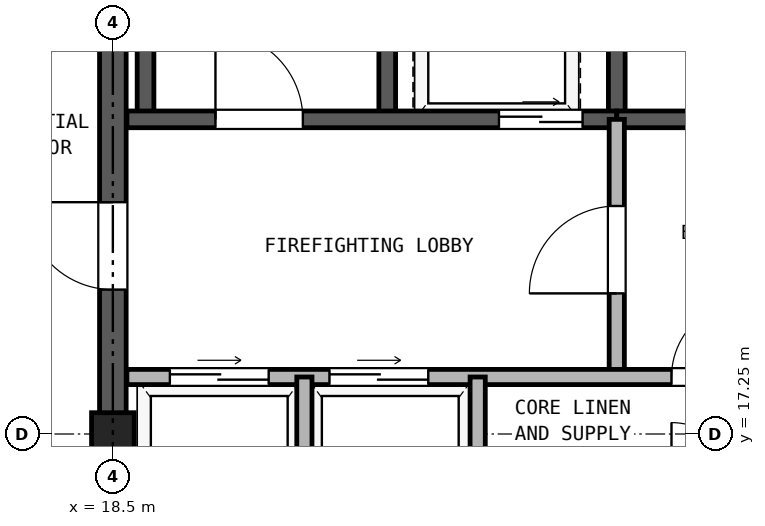
"""IFC4 building model, lengths in metres.
Left out: names, types, materials, properties, quantities, classifications, styles, units other than length and angle.
Written with IfcOpenShell. Run it as: python <this file> out.ifc"""

import sys

from ifc_helpers import new_model, si_unit, direction, frame, frame_2d, origin, origin_2d, place, context, subcontext, project, spatial, rectangle, hollow_rectangle, extrude, source, transform, mapped, element, fill, save


model = new_model("IFC4")
c1 = context("Model", 3, precision=1e-05, world=origin(), true_north=direction((0.0, 1.0)))
c2 = subcontext(c1, "Body", "Model", "MODEL_VIEW")
j1 = project(units=[si_unit("LENGTHUNIT", "METRE"), si_unit("PLANEANGLEUNIT", "RADIAN")], contexts=[c1])
p1 = place(None, origin())
s1 = spatial("IfcSite", under=j1, at=p1, CompositionType="ELEMENT")
p2 = place(p1, origin())
s2 = spatial("IfcBuilding", under=s1, at=p2, CompositionType="ELEMENT")
p3 = place(p2, frame((0.0, 0.0, 245.7)))
s3 = spatial("IfcBuildingStorey", under=s2, at=p3, CompositionType="ELEMENT", Elevation=245.7)
m1 = source(origin(), c2, "Body", "SweptSolid", [
    extrude(hollow_rectangle(XDim=0.56, YDim=0.56, WallThickness=0.03, at=origin_2d()), origin(), (0.0, 0.0, 1.0), 2.98),
])
p4 = place(p3, frame((18.5, 17.25, 0.0), z_axis=(0.0, 0.0, 1.0), x_axis=(1.0, 0.0, 0.0)))
e1 = element("IfcColumn", 1, at=p4, inside=s3, PredefinedType="COLUMN", context=c2, shape_type="MappedRepresentation", body=[
    mapped(m1, transform((0.0, 0.0, 0.0), x_axis=(1.0, 0.0, 0.0), y_axis=(0.0, 1.0, 0.0), z_axis=(0.0, 0.0, 1.0), scale=1.0)),
])
p5 = place(p3, frame((18.5, 11.675, 0.0), z_axis=(0.0, 0.0, 1.0), x_axis=(0.0, 1.0, 0.0)))
e2 = element("IfcWall", 2, at=p5, inside=s3, PredefinedType="SHEAR", context=c2, shape_type="SweptSolid", body=[
    extrude(rectangle(XDim=16.9, YDim=0.35, at=frame_2d((8.45, 0.0))), origin(), (0.0, 0.0, 1.0), 2.98),
])
p6 = place(p5, frame((7.475, 0.0, 0.0)))
e3 = element("IfcOpeningElement", 3, at=p6, cuts=e2, PredefinedType="OPENING", context=c2, shape_type="SweptSolid", body=[
    extrude(rectangle(XDim=1.15, YDim=2.2, at=frame_2d((0.575, 1.1))), frame((0.0, 0.185, 0.0), z_axis=(0.0, -1.0, 0.0), x_axis=(1.0, 0.0, 0.0)), (0.0, 0.0, 1.0), 0.37),
])
for number, where, z_axis, x_axis in (
    (4, (18.93, 21.39, 0.0), (0.0, 0.0, 1.0), (0.0, 1.0, 0.0)),
    (5, (22.11, 21.39, 0.0), (0.0, 0.0, 1.0), (0.0, 1.0, 0.0)),
    (6, (25.13, 21.39, 0.0), (0.0, 0.0, 1.0), (0.0, 1.0, 0.0)),
):
    element("IfcWall", number, at=place(p3, frame(where, z_axis=z_axis, x_axis=x_axis)), inside=s3, PredefinedType="SOLIDWALL", context=c2, shape_type="SweptSolid", body=[
        extrude(rectangle(XDim=7.11, YDim=0.22, at=frame_2d((3.555, 0.0))), origin(), (0.0, 0.0, 1.0), 2.98),
    ])
p7 = place(p3, frame((18.685, 21.39, 0.0), z_axis=(0.0, 0.0, 1.0), x_axis=(1.0, 0.0, 0.0)))
e7 = element("IfcWall", 7, at=p7, inside=s3, PredefinedType="SOLIDWALL", context=c2, shape_type="SweptSolid", body=[
    extrude(rectangle(XDim=6.445, YDim=0.22, at=frame_2d((3.222, 0.0))), origin(), (0.0, 0.0, 1.0), 2.98),
])
p8 = place(p7, frame((1.165, 0.0, 0.0)))
e8 = element("IfcOpeningElement", 8, at=p8, cuts=e7, PredefinedType="OPENING", context=c2, shape_type="SweptSolid", body=[
    extrude(rectangle(XDim=1.15, YDim=2.2, at=frame_2d((0.575, 1.1))), frame((0.0, 0.12, 0.0), z_axis=(0.0, -1.0, 0.0), x_axis=(1.0, 0.0, 0.0)), (0.0, 0.0, 1.0), 0.24),
])
p9 = place(p7, frame((4.895, 0.0, 0.0)))
e9 = element("IfcOpeningElement", 9, at=p9, cuts=e7, PredefinedType="OPENING", context=c2, shape_type="SweptSolid", body=[
    extrude(rectangle(XDim=1.1, YDim=2.25, at=frame_2d((0.55, 1.125))), frame((0.0, 0.12, 0.0), z_axis=(0.0, -1.0, 0.0), x_axis=(1.0, 0.0, 0.0)), (0.0, 0.0, 1.0), 0.24),
])
p10 = place(p3, frame((25.13, 21.39, 0.0), z_axis=(0.0, 0.0, 1.0), x_axis=(1.0, 0.0, 0.0)))
e10 = element("IfcWall", 10, at=p10, inside=s3, PredefinedType="SOLIDWALL", context=c2, shape_type="SweptSolid", body=[
    extrude(rectangle(XDim=3.185, YDim=0.22, at=frame_2d((1.593, 0.0))), origin(), (0.0, 0.0, 1.0), 2.98),
])
p11 = place(p10, frame((0.92, 0.0, 0.0)))
e11 = element("IfcOpeningElement", 11, at=p11, cuts=e10, PredefinedType="OPENING", context=c2, shape_type="SweptSolid", body=[
    extrude(rectangle(XDim=1.15, YDim=2.2, at=frame_2d((0.575, 1.1))), frame((0.0, 0.12, 0.0), z_axis=(0.0, -1.0, 0.0), x_axis=(1.0, 0.0, 0.0)), (0.0, 0.0, 1.0), 0.24),
])
p12 = place(p3, frame((25.13, 18.0, 0.0), z_axis=(0.0, 0.0, 1.0), x_axis=(0.0, 1.0, 0.0)))
e12 = element("IfcWall", 12, at=p12, inside=s3, PredefinedType="PARTITIONING", context=c2, shape_type="SweptSolid", body=[
    extrude(rectangle(XDim=3.39, YDim=0.2, at=frame_2d((1.695, 0.0))), origin(), (0.0, 0.0, 1.0), 2.98),
])
p13 = place(p12, frame((1.1, 0.0, 0.0)))
e13 = element("IfcOpeningElement", 13, at=p13, cuts=e12, PredefinedType="OPENING", context=c2, shape_type="SweptSolid", body=[
    extrude(rectangle(XDim=1.15, YDim=2.2, at=frame_2d((0.575, 1.1))), frame((0.0, 0.11, 0.0), z_axis=(0.0, -1.0, 0.0), x_axis=(1.0, 0.0, 0.0)), (0.0, 0.0, 1.0), 0.22),
])
p14 = place(p3, frame((18.685, 18.0, 0.0), z_axis=(0.0, 0.0, 1.0), x_axis=(1.0, 0.0, 0.0)))
e14 = element("IfcWall", 14, at=p14, inside=s3, PredefinedType="PARTITIONING", context=c2, shape_type="SweptSolid", body=[
    extrude(rectangle(XDim=9.63, YDim=0.2, at=frame_2d((4.815, 0.0))), origin(), (0.0, 0.0, 1.0), 2.98),
])
p15 = place(p14, frame((0.565, 0.0, 0.0)))
e15 = element("IfcOpeningElement", 15, at=p15, cuts=e14, PredefinedType="OPENING", context=c2, shape_type="SweptSolid", body=[
    extrude(rectangle(XDim=1.3, YDim=2.3, at=frame_2d((0.65, 1.15))), frame((0.0, 0.11, 0.0), z_axis=(0.0, -1.0, 0.0), x_axis=(1.0, 0.0, 0.0)), (0.0, 0.0, 1.0), 0.22),
])
p16 = place(p14, frame((2.665, 0.0, 0.0)))
e16 = element("IfcOpeningElement", 16, at=p16, cuts=e14, PredefinedType="OPENING", context=c2, shape_type="SweptSolid", body=[
    extrude(rectangle(XDim=1.3, YDim=2.3, at=frame_2d((0.65, 1.15))), frame((0.0, 0.11, 0.0), z_axis=(0.0, -1.0, 0.0), x_axis=(1.0, 0.0, 0.0)), (0.0, 0.0, 1.0), 0.22),
])
p17 = place(p14, frame((7.165, 0.0, 0.0)))
e17 = element("IfcOpeningElement", 17, at=p17, cuts=e14, PredefinedType="OPENING", context=c2, shape_type="SweptSolid", body=[
    extrude(rectangle(XDim=1.0, YDim=2.15, at=frame_2d((0.5, 1.075))), frame((0.0, 0.11, 0.0), z_axis=(0.0, -1.0, 0.0), x_axis=(1.0, 0.0, 0.0)), (0.0, 0.0, 1.0), 0.22),
])
for number, where, z_axis, x_axis in (
    (18, (21.02, 15.0, 0.0), (0.0, 0.0, 1.0), (0.0, 1.0, 0.0)),
    (19, (23.3, 15.0, 0.0), (0.0, 0.0, 1.0), (0.0, 1.0, 0.0)),
):
    element("IfcWall", number, at=place(p3, frame(where, z_axis=z_axis, x_axis=x_axis)), inside=s3, PredefinedType="PARTITIONING", context=c2, shape_type="SweptSolid", body=[
        extrude(rectangle(XDim=3.0, YDim=0.2, at=frame_2d((1.5, 0.0))), origin(), (0.0, 0.0, 1.0), 2.98),
    ])
p18 = place(p8, frame((1.15, 0.0, 0.0), z_axis=(0.0, 0.0, 1.0), x_axis=(-1.0, 0.0, 0.0)))
e20 = element("IfcDoor", 20, at=p18, inside=s3, OperationType="SINGLE_SWING_LEFT", PredefinedType="DOOR", context=c2, shape_type="SweptSolid", body=[
    extrude(rectangle(XDim=1.15, YDim=2.2, at=frame_2d((0.575, 1.1))), frame((0.0, 0.025, 0.0), z_axis=(0.0, -1.0, 0.0), x_axis=(1.0, 0.0, 0.0)), (0.0, 0.0, 1.0), 0.05),
])
fill(e8, e20)
p19 = place(p9, frame((1.1, 0.0, 0.0), z_axis=(0.0, 0.0, 1.0), x_axis=(-1.0, 0.0, 0.0)))
e21 = element("IfcDoor", 21, at=p19, inside=s3, OperationType="DOUBLE_DOOR_SLIDING", PredefinedType="DOOR", context=c2, shape_type="SweptSolid", body=[
    extrude(rectangle(XDim=1.1, YDim=2.25, at=frame_2d((0.55, 1.125))), frame((0.0, 0.025, 0.0), z_axis=(0.0, -1.0, 0.0), x_axis=(1.0, 0.0, 0.0)), (0.0, 0.0, 1.0), 0.05),
])
fill(e9, e21)
p20 = place(p13, origin())
e22 = element("IfcDoor", 22, at=p20, inside=s3, OperationType="SINGLE_SWING_LEFT", PredefinedType="DOOR", context=c2, shape_type="SweptSolid", body=[
    extrude(rectangle(XDim=1.15, YDim=2.2, at=frame_2d((0.575, 1.1))), frame((0.0, 0.025, 0.0), z_axis=(0.0, -1.0, 0.0), x_axis=(1.0, 0.0, 0.0)), (0.0, 0.0, 1.0), 0.05),
])
fill(e13, e22)
p21 = place(p15, origin())
e23 = element("IfcDoor", 23, at=p21, inside=s3, OperationType="DOUBLE_DOOR_SLIDING", PredefinedType="DOOR", context=c2, shape_type="SweptSolid", body=[
    extrude(rectangle(XDim=1.3, YDim=2.3, at=frame_2d((0.65, 1.15))), frame((0.0, 0.025, 0.0), z_axis=(0.0, -1.0, 0.0), x_axis=(1.0, 0.0, 0.0)), (0.0, 0.0, 1.0), 0.05),
])
fill(e15, e23)
p22 = place(p16, origin())
e24 = element("IfcDoor", 24, at=p22, inside=s3, OperationType="DOUBLE_DOOR_SLIDING", PredefinedType="DOOR", context=c2, shape_type="SweptSolid", body=[
    extrude(rectangle(XDim=1.3, YDim=2.3, at=frame_2d((0.65, 1.15))), frame((0.0, 0.025, 0.0), z_axis=(0.0, -1.0, 0.0), x_axis=(1.0, 0.0, 0.0)), (0.0, 0.0, 1.0), 0.05),
])
fill(e16, e24)
p23 = place(p17, frame((1.0, 0.0, 0.0), z_axis=(0.0, 0.0, 1.0), x_axis=(-1.0, 0.0, 0.0)))
e25 = element("IfcDoor", 25, at=p23, inside=s3, OperationType="SINGLE_SWING_RIGHT", PredefinedType="DOOR", context=c2, shape_type="SweptSolid", body=[
    extrude(rectangle(XDim=1.0, YDim=2.15, at=frame_2d((0.5, 1.075))), frame((0.0, 0.025, 0.0), z_axis=(0.0, -1.0, 0.0), x_axis=(1.0, 0.0, 0.0)), (0.0, 0.0, 1.0), 0.05),
])
fill(e17, e25)
p24 = place(p6, frame((1.15, 0.0, 0.0), z_axis=(0.0, 0.0, 1.0), x_axis=(-1.0, 0.0, 0.0)))
e26 = element("IfcDoor", 26, at=p24, inside=s3, OperationType="SINGLE_SWING_RIGHT", PredefinedType="DOOR", context=c2, shape_type="SweptSolid", body=[
    extrude(rectangle(XDim=1.15, YDim=2.2, at=frame_2d((0.575, 1.1))), frame((0.0, 0.025, 0.0), z_axis=(0.0, -1.0, 0.0), x_axis=(1.0, 0.0, 0.0)), (0.0, 0.0, 1.0), 0.05),
])
fill(e3, e26)
save(model, sys.argv[1])
